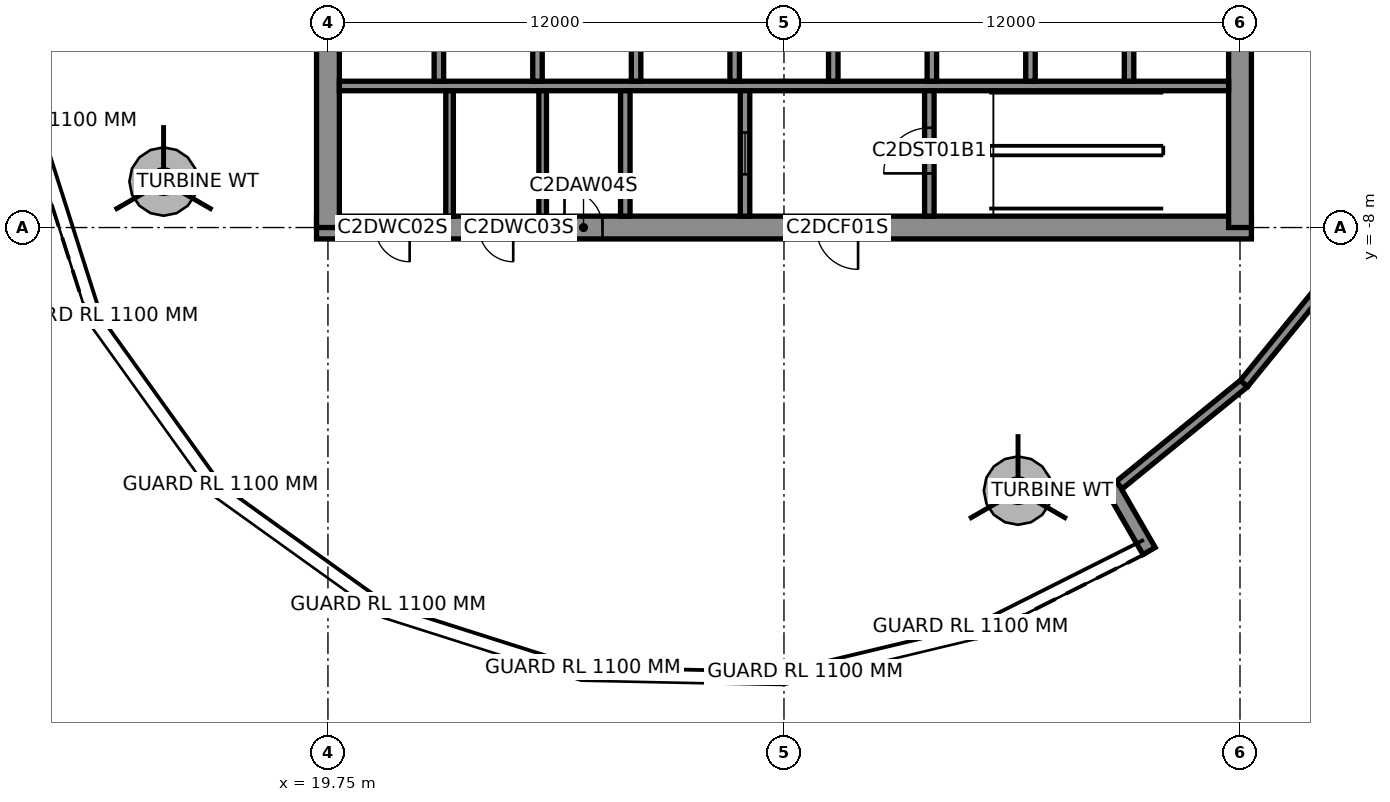
"""IFC4 building model, lengths in metres.
Left out: names, types, materials, properties, quantities, classifications, styles, units other than length and angle.
Written with IfcOpenShell. Run it as: python <this file> out.ifc"""

import sys

from ifc_helpers import new_model, si_unit, direction, frame, frame_2d, origin, place, context, subcontext, project, spatial, rectangle, extrude, element, fill, save


model = new_model("IFC4")
c1 = context("Model", 3, precision=1e-05, world=origin(), true_north=direction((0.0, 1.0)))
c2 = subcontext(c1, "Body", "Model", "MODEL_VIEW")
j1 = project(units=[si_unit("LENGTHUNIT", "METRE"), si_unit("PLANEANGLEUNIT", "RADIAN")], contexts=[c1])
p1 = place(None, origin())
s1 = spatial("IfcSite", under=j1, at=p1, CompositionType="ELEMENT")
p2 = place(p1, origin())
s2 = spatial("IfcBuilding", under=s1, at=p2, CompositionType="ELEMENT")
p3 = place(p2, frame((0.0, 0.0, 204.5)))
s3 = spatial("IfcBuildingStorey", under=s2, at=p3, CompositionType="ELEMENT", Elevation=204.5)
p4 = place(p3, frame((40.368, -14.796, 0.0), z_axis=(0.0, 0.0, 1.0), x_axis=(0.500063959222, -0.865988473761, 0.0)))
e1 = element("IfcWall", 1, at=p4, inside=s3, PredefinedType="STANDARD", context=c2, shape_type="SweptSolid", body=[
    extrude(rectangle(XDim=1.98, YDim=0.37, at=frame_2d((0.99, 0.0))), origin(), (0.0, 0.0, 1.0), 5.317),
])
p5 = place(p3, frame((43.854, -12.104, 0.0), z_axis=(0.0, 0.0, 1.0), x_axis=(-0.775360445099, -0.631518946807, 0.0)))
e2 = element("IfcWall", 2, at=p5, inside=s3, PredefinedType="STANDARD", context=c2, shape_type="SweptSolid", body=[
    extrude(rectangle(XDim=4.235, YDim=0.25, at=frame_2d((2.117, 0.0))), origin(), (0.0, 0.0, 1.0), 5.444),
])
p6 = place(p3, frame((46.684, -8.63, 0.0), z_axis=(0.0, 0.0, 1.0), x_axis=(-0.631521345751, -0.77535849119, 0.0)))
e3 = element("IfcWall", 3, at=p6, inside=s3, PredefinedType="STANDARD", context=c2, shape_type="SweptSolid", body=[
    extrude(rectangle(XDim=4.481, YDim=0.25, at=frame_2d((2.24, 0.0))), origin(), (0.0, 0.0, 1.0), 5.444),
])
p7 = place(p3, frame((19.45, -8.0, 0.0), z_axis=(0.0, 0.0, 1.0), x_axis=(1.0, 0.0, 0.0)))
e4 = element("IfcWall", 4, at=p7, inside=s3, PredefinedType="SHEAR", context=c2, shape_type="SweptSolid", body=[
    extrude(rectangle(XDim=24.6, YDim=0.6, at=frame_2d((12.3, 0.0))), origin(), (0.0, 0.0, 1.0), 6.0),
])
p8 = place(p7, frame((13.15, 0.0, 0.0)))
e5 = element("IfcOpeningElement", 5, at=p8, cuts=e4, PredefinedType="OPENING", context=c2, shape_type="SweptSolid", body=[
    extrude(rectangle(XDim=1.1, YDim=2.1, at=frame_2d((0.55, 1.05))), frame((0.0, 0.31, 0.0), z_axis=(0.0, -1.0, 0.0), x_axis=(1.0, 0.0, 0.0)), (0.0, 0.0, 1.0), 0.62),
])
p9 = place(p7, frame((1.55, 0.0, 0.0)))
e6 = element("IfcOpeningElement", 6, at=p9, cuts=e4, PredefinedType="OPENING", context=c2, shape_type="SweptSolid", body=[
    extrude(rectangle(XDim=0.9, YDim=2.1, at=frame_2d((0.45, 1.05))), frame((0.0, 0.31, 0.0), z_axis=(0.0, -1.0, 0.0), x_axis=(1.0, 0.0, 0.0)), (0.0, 0.0, 1.0), 0.62),
])
p10 = place(p7, frame((4.275, 0.0, 0.0)))
e7 = element("IfcOpeningElement", 7, at=p10, cuts=e4, PredefinedType="OPENING", context=c2, shape_type="SweptSolid", body=[
    extrude(rectangle(XDim=0.9, YDim=2.1, at=frame_2d((0.45, 1.05))), frame((0.0, 0.31, 0.0), z_axis=(0.0, -1.0, 0.0), x_axis=(1.0, 0.0, 0.0)), (0.0, 0.0, 1.0), 0.62),
])
p11 = place(p7, frame((6.525, 0.0, 0.0)))
e8 = element("IfcOpeningElement", 8, at=p11, cuts=e4, PredefinedType="OPENING", context=c2, shape_type="SweptSolid", body=[
    extrude(rectangle(XDim=1.0, YDim=2.1, at=frame_2d((0.5, 1.05))), frame((0.0, 0.31, 0.0), z_axis=(0.0, -1.0, 0.0), x_axis=(1.0, 0.0, 0.0)), (0.0, 0.0, 1.0), 0.62),
])
p12 = place(p3, frame((43.75, -8.0, 0.0), z_axis=(0.0, 0.0, 1.0), x_axis=(0.0, 1.0, 0.0)))
e9 = element("IfcWall", 9, at=p12, inside=s3, PredefinedType="SHEAR", context=c2, shape_type="SweptSolid", body=[
    extrude(rectangle(XDim=16.0, YDim=0.6, at=frame_2d((8.0, 0.0))), origin(), (0.0, 0.0, 1.0), 6.0),
])
p13 = place(p12, frame((7.1, 0.0, 0.0)))
e10 = element("IfcOpeningElement", 10, at=p13, cuts=e9, PredefinedType="OPENING", context=c2, shape_type="SweptSolid", body=[
    extrude(rectangle(XDim=1.8, YDim=2.1, at=frame_2d((0.9, 1.05))), frame((0.0, 0.31, 0.0), z_axis=(0.0, -1.0, 0.0), x_axis=(1.0, 0.0, 0.0)), (0.0, 0.0, 1.0), 0.62),
])
p14 = place(p3, frame((19.75, -8.0, 0.0), z_axis=(0.0, 0.0, 1.0), x_axis=(0.0, 1.0, 0.0)))
e11 = element("IfcWall", 11, at=p14, inside=s3, PredefinedType="SHEAR", context=c2, shape_type="SweptSolid", body=[
    extrude(rectangle(XDim=16.0, YDim=0.6, at=frame_2d((8.0, 0.0))), origin(), (0.0, 0.0, 1.0), 6.0),
])
p15 = place(p14, frame((7.1, 0.0, 0.0)))
e12 = element("IfcOpeningElement", 12, at=p15, cuts=e11, PredefinedType="OPENING", context=c2, shape_type="SweptSolid", body=[
    extrude(rectangle(XDim=1.8, YDim=2.1, at=frame_2d((0.9, 1.05))), frame((0.0, 0.31, 0.0), z_axis=(0.0, -1.0, 0.0), x_axis=(1.0, 0.0, 0.0)), (0.0, 0.0, 1.0), 0.62),
])
p16 = place(p3, frame((20.05, -4.275, 0.0), z_axis=(0.0, 0.0, 1.0), x_axis=(1.0, 0.0, 0.0)))
e13 = element("IfcWall", 13, at=p16, inside=s3, PredefinedType="SHEAR", context=c2, shape_type="SweptSolid", body=[
    extrude(rectangle(XDim=23.4, YDim=0.25, at=frame_2d((11.7, 0.0))), origin(), (0.0, 0.0, 1.0), 6.0),
])
for number, where, z_axis, x_axis in (
    (14, (22.669, -4.15, 0.0), (0.0, 0.0, 1.0), (0.0, 1.0, 0.0)),
    (15, (25.264, -4.15, 0.0), (0.0, 0.0, 1.0), (0.0, 1.0, 0.0)),
    (16, (27.858, -4.15, 0.0), (0.0, 0.0, 1.0), (0.0, 1.0, 0.0)),
    (17, (30.453, -4.15, 0.0), (0.0, 0.0, 1.0), (0.0, 1.0, 0.0)),
    (18, (33.047, -4.15, 0.0), (0.0, 0.0, 1.0), (0.0, 1.0, 0.0)),
    (19, (35.642, -4.15, 0.0), (0.0, 0.0, 1.0), (0.0, 1.0, 0.0)),
    (20, (38.236, -4.15, 0.0), (0.0, 0.0, 1.0), (0.0, 1.0, 0.0)),
    (21, (40.831, -4.15, 0.0), (0.0, 0.0, 1.0), (0.0, 1.0, 0.0)),
):
    element("IfcWall", number, at=place(p3, frame(where, z_axis=z_axis, x_axis=x_axis)), inside=s3, PredefinedType="SHEAR", context=c2, shape_type="SweptSolid", body=[
        extrude(rectangle(XDim=2.4, YDim=0.25, at=frame_2d((1.2, 0.0))), origin(), (0.0, 0.0, 1.0), 6.0),
    ])
p17 = place(p3, frame((35.575, -4.4, 0.0), z_axis=(0.0, 0.0, 1.0), x_axis=(0.0, -1.0, 0.0)))
e22 = element("IfcWall", 22, at=p17, inside=s3, PredefinedType="SHEAR", context=c2, shape_type="SweptSolid", body=[
    extrude(rectangle(XDim=3.3, YDim=0.25, at=frame_2d((1.65, 0.0))), origin(), (0.0, 0.0, 1.0), 6.0),
])
p18 = place(p17, frame((0.975, 0.0, 0.0)))
e23 = element("IfcOpeningElement", 23, at=p18, cuts=e22, PredefinedType="OPENING", context=c2, shape_type="SweptSolid", body=[
    extrude(rectangle(XDim=1.2, YDim=2.1, at=frame_2d((0.6, 1.05))), frame((0.0, 0.135, 0.0), z_axis=(0.0, -1.0, 0.0), x_axis=(1.0, 0.0, 0.0)), (0.0, 0.0, 1.0), 0.27),
])
p19 = place(p3, frame((30.725, -4.4, 0.0), z_axis=(0.0, 0.0, 1.0), x_axis=(0.0, -1.0, 0.0)))
e24 = element("IfcWall", 24, at=p19, inside=s3, PredefinedType="SHEAR", context=c2, shape_type="SweptSolid", body=[
    extrude(rectangle(XDim=3.3, YDim=0.25, at=frame_2d((1.65, 0.0))), origin(), (0.0, 0.0, 1.0), 6.0),
])
p20 = place(p19, frame((1.1, 0.0, 0.0)))
e25 = element("IfcOpeningElement", 25, at=p20, cuts=e24, PredefinedType="OPENING", context=c2, shape_type="SweptSolid", body=[
    extrude(rectangle(XDim=1.1, YDim=2.1, at=frame_2d((0.55, 1.05))), frame((0.0, 0.135, 0.0), z_axis=(0.0, -1.0, 0.0), x_axis=(1.0, 0.0, 0.0)), (0.0, 0.0, 1.0), 0.27),
])
p21 = place(p3, frame((27.575, -4.4, 0.0), z_axis=(0.0, 0.0, 1.0), x_axis=(0.0, -1.0, 0.0)))
e26 = element("IfcWall", 26, at=p21, inside=s3, PredefinedType="SHEAR", context=c2, shape_type="SweptSolid", body=[
    extrude(rectangle(XDim=3.3, YDim=0.25, at=frame_2d((1.65, 0.0))), origin(), (0.0, 0.0, 1.0), 6.0),
])
for number, where, z_axis, x_axis in (
    (27, (22.95, -4.4, 0.0), (0.0, 0.0, 1.0), (0.0, -1.0, 0.0)),
    (28, (25.4, -4.4, 0.0), (0.0, 0.0, 1.0), (0.0, -1.0, 0.0)),
):
    element("IfcWall", number, at=place(p3, frame(where, z_axis=z_axis, x_axis=x_axis)), inside=s3, PredefinedType="PARTITIONING", context=c2, shape_type="SweptSolid", body=[
        extrude(rectangle(XDim=3.3, YDim=0.2, at=frame_2d((1.65, 0.0))), origin(), (0.0, 0.0, 1.0), 6.0),
    ])
p22 = place(p3, frame((16.75, -8.66, 0.0), z_axis=(0.0, 0.0, 1.0), x_axis=(0.0, -1.0, 0.0)))
e29 = element("IfcWall", 29, at=p22, inside=s3, PredefinedType="PARTITIONING", context=c2, shape_type="SweptSolid", body=[
    extrude(rectangle(XDim=2.34, YDim=0.2, at=frame_2d((1.17, 0.0))), origin(), (0.0, 0.0, 1.0), 5.485),
])
p23 = place(p3, frame((16.85, -11.0, 0.0), z_axis=(0.0, 0.0, 1.0), x_axis=(1.0, 0.0, 0.0)))
e30 = element("IfcWall", 30, at=p23, inside=s3, PredefinedType="PARTITIONING", context=c2, shape_type="SweptSolid", body=[
    extrude(rectangle(XDim=11.952, YDim=0.2, at=frame_2d((5.976, 0.0))), origin(), (0.0, 0.0, 1.0), 5.237),
])
p24 = place(p23, frame((6.984, 0.0, 0.0)))
e31 = element("IfcOpeningElement", 31, at=p24, cuts=e30, PredefinedType="OPENING", context=c2, shape_type="SweptSolid", body=[
    extrude(rectangle(XDim=1.0, YDim=2.1, at=frame_2d((0.5, 1.05))), frame((0.0, 0.11, 0.0), z_axis=(0.0, -1.0, 0.0), x_axis=(1.0, 0.0, 0.0)), (0.0, 0.0, 1.0), 0.22),
])
p25 = place(p3, frame((28.802, -11.0, 0.0), z_axis=(0.0, 0.0, 1.0), x_axis=(1.0, 0.0, 0.0)))
e32 = element("IfcWall", 32, at=p25, inside=s3, PredefinedType="PARTITIONING", context=c2, shape_type="SweptSolid", body=[
    extrude(rectangle(XDim=9.298, YDim=0.2, at=frame_2d((4.649, 0.0))), origin(), (0.0, 0.0, 1.0), 5.237),
])
p26 = place(p25, frame((4.149, 0.0, 0.0)))
e33 = element("IfcOpeningElement", 33, at=p26, cuts=e32, PredefinedType="OPENING", context=c2, shape_type="SweptSolid", body=[
    extrude(rectangle(XDim=1.0, YDim=2.1, at=frame_2d((0.5, 1.05))), frame((0.0, 0.11, 0.0), z_axis=(0.0, -1.0, 0.0), x_axis=(1.0, 0.0, 0.0)), (0.0, 0.0, 1.0), 0.22),
])
p27 = place(p3, frame((38.101, -11.0, 0.0), z_axis=(0.0, 0.0, 1.0), x_axis=(1.0, 0.0, 0.0)))
e34 = element("IfcWall", 34, at=p27, inside=s3, PredefinedType="PARTITIONING", context=c2, shape_type="SweptSolid", body=[
    extrude(rectangle(XDim=6.492, YDim=0.2, at=frame_2d((3.246, 0.0))), origin(), (0.0, 0.0, 1.0), 5.307),
])
p28 = place(p27, frame((2.057, 0.0, 0.0)))
e35 = element("IfcOpeningElement", 35, at=p28, cuts=e34, PredefinedType="OPENING", context=c2, shape_type="SweptSolid", body=[
    extrude(rectangle(XDim=1.0, YDim=2.1, at=frame_2d((0.5, 1.05))), frame((0.0, 0.11, 0.0), z_axis=(0.0, -1.0, 0.0), x_axis=(1.0, 0.0, 0.0)), (0.0, 0.0, 1.0), 0.22),
])
p29 = place(p3, frame((16.75, 4.019, 0.0), z_axis=(0.0, 0.0, 1.0), x_axis=(0.0, -1.0, 0.0)))
e36 = element("IfcWall", 36, at=p29, inside=s3, PredefinedType="PARTITIONING", context=c2, shape_type="SweptSolid", body=[
    extrude(rectangle(XDim=12.68, YDim=0.2, at=frame_2d((6.34, 0.0))), origin(), (0.0, 0.0, 1.0), 5.434),
])
p30 = place(p29, frame((5.84, 0.0, 0.0)))
e37 = element("IfcOpeningElement", 37, at=p30, cuts=e36, PredefinedType="OPENING", context=c2, shape_type="SweptSolid", body=[
    extrude(rectangle(XDim=1.0, YDim=2.1, at=frame_2d((0.5, 1.05))), frame((0.0, 0.11, 0.0), z_axis=(0.0, -1.0, 0.0), x_axis=(1.0, 0.0, 0.0)), (0.0, 0.0, 1.0), 0.22),
])
p31 = place(p3, frame((26.391, -20.0, 0.0), z_axis=(0.0, 0.0, 1.0), x_axis=(0.258820206775, 0.965925515019, 0.0)))
e38 = element("IfcWall", 38, at=p31, inside=s3, PredefinedType="PARTITIONING", context=c2, shape_type="SweptSolid", body=[
    extrude(rectangle(XDim=9.188, YDim=0.2, at=frame_2d((4.594, 0.0))), origin(), (0.0, 0.0, 1.0), 5.237),
])
p32 = place(p3, frame((16.6, -8.747, 0.0), z_axis=(0.0, 0.0, 1.0), x_axis=(-0.866025356753, -0.50000008146, 0.0)))
e39 = element("IfcWall", 39, at=p32, inside=s3, PredefinedType="PARTITIONING", context=c2, shape_type="SweptSolid", body=[
    extrude(rectangle(XDim=3.679, YDim=0.2, at=frame_2d((1.84, 0.0))), origin(), (0.0, 0.0, 1.0), 5.434),
])
p33 = place(p3, frame((40.312, -14.829, 0.0), z_axis=(0.0, 0.0, 1.0), x_axis=(-0.499971184285, 0.866042039906, 0.0)))
e40 = element("IfcWall", 40, at=p33, inside=s3, PredefinedType="PARTITIONING", context=c2, shape_type="SweptSolid", body=[
    extrude(rectangle(XDim=4.248, YDim=0.2, at=frame_2d((2.124, 0.0))), origin(), (0.0, 0.0, 1.0), 5.307),
])
p34 = place(p8, origin())
e41 = element("IfcDoor", 41, at=p34, inside=s3, OperationType="SINGLE_SWING_RIGHT", PredefinedType="DOOR", context=c2, shape_type="SweptSolid", body=[
    extrude(rectangle(XDim=1.1, YDim=2.1, at=frame_2d((0.55, 1.05))), frame((0.0, 0.3, 0.0), z_axis=(0.0, -1.0, 0.0), x_axis=(1.0, 0.0, 0.0)), (0.0, 0.0, 1.0), 0.05),
])
fill(e5, e41)
p35 = place(p9, origin())
e42 = element("IfcDoor", 42, at=p35, inside=s3, OperationType="SINGLE_SWING_RIGHT", PredefinedType="DOOR", context=c2, shape_type="SweptSolid", body=[
    extrude(rectangle(XDim=0.9, YDim=2.1, at=frame_2d((0.45, 1.05))), frame((0.0, 0.3, 0.0), z_axis=(0.0, -1.0, 0.0), x_axis=(1.0, 0.0, 0.0)), (0.0, 0.0, 1.0), 0.05),
])
fill(e6, e42)
p36 = place(p10, origin())
e43 = element("IfcDoor", 43, at=p36, inside=s3, OperationType="SINGLE_SWING_RIGHT", PredefinedType="DOOR", context=c2, shape_type="SweptSolid", body=[
    extrude(rectangle(XDim=0.9, YDim=2.1, at=frame_2d((0.45, 1.05))), frame((0.0, 0.3, 0.0), z_axis=(0.0, -1.0, 0.0), x_axis=(1.0, 0.0, 0.0)), (0.0, 0.0, 1.0), 0.05),
])
fill(e7, e43)
p37 = place(p11, origin())
e44 = element("IfcDoor", 44, at=p37, inside=s3, OperationType="SINGLE_SWING_LEFT", PredefinedType="DOOR", context=c2, shape_type="SweptSolid", body=[
    extrude(rectangle(XDim=1.0, YDim=2.1, at=frame_2d((0.5, 1.05))), frame((0.0, 0.3, 0.0), z_axis=(0.0, -1.0, 0.0), x_axis=(1.0, 0.0, 0.0)), (0.0, 0.0, 1.0), 0.05),
])
fill(e8, e44)
p38 = place(p18, origin())
e45 = element("IfcDoor", 45, at=p38, inside=s3, OperationType="SINGLE_SWING_RIGHT", PredefinedType="DOOR", context=c2, shape_type="SweptSolid", body=[
    extrude(rectangle(XDim=1.2, YDim=2.1, at=frame_2d((0.6, 1.05))), frame((0.0, 0.025, 0.0), z_axis=(0.0, -1.0, 0.0), x_axis=(1.0, 0.0, 0.0)), (0.0, 0.0, 1.0), 0.05),
])
fill(e23, e45)
p39 = place(p20, origin())
e46 = element("IfcDoor", 46, at=p39, inside=s3, OperationType="DOUBLE_DOOR_SLIDING", PredefinedType="DOOR", context=c2, shape_type="SweptSolid", body=[
    extrude(rectangle(XDim=1.1, YDim=2.1, at=frame_2d((0.55, 1.05))), frame((0.0, 0.025, 0.0), z_axis=(0.0, -1.0, 0.0), x_axis=(1.0, 0.0, 0.0)), (0.0, 0.0, 1.0), 0.05),
])
fill(e25, e46)
p40 = place(p24, origin())
e47 = element("IfcDoor", 47, at=p40, inside=s3, OperationType="SINGLE_SWING_RIGHT", PredefinedType="DOOR", context=c2, shape_type="SweptSolid", body=[
    extrude(rectangle(XDim=1.0, YDim=2.1, at=frame_2d((0.5, 1.05))), frame((0.0, 0.025, 0.0), z_axis=(0.0, -1.0, 0.0), x_axis=(1.0, 0.0, 0.0)), (0.0, 0.0, 1.0), 0.05),
])
fill(e31, e47)
p41 = place(p26, origin())
e48 = element("IfcDoor", 48, at=p41, inside=s3, OperationType="SINGLE_SWING_LEFT", PredefinedType="DOOR", context=c2, shape_type="SweptSolid", body=[
    extrude(rectangle(XDim=1.0, YDim=2.1, at=frame_2d((0.5, 1.05))), frame((0.0, 0.025, 0.0), z_axis=(0.0, -1.0, 0.0), x_axis=(1.0, 0.0, 0.0)), (0.0, 0.0, 1.0), 0.05),
])
fill(e33, e48)
p42 = place(p28, origin())
e49 = element("IfcDoor", 49, at=p42, inside=s3, OperationType="SINGLE_SWING_RIGHT", PredefinedType="DOOR", context=c2, shape_type="SweptSolid", body=[
    extrude(rectangle(XDim=1.0, YDim=2.1, at=frame_2d((0.5, 1.05))), frame((0.0, 0.025, 0.0), z_axis=(0.0, -1.0, 0.0), x_axis=(1.0, 0.0, 0.0)), (0.0, 0.0, 1.0), 0.05),
])
fill(e35, e49)
save(model, sys.argv[1])
